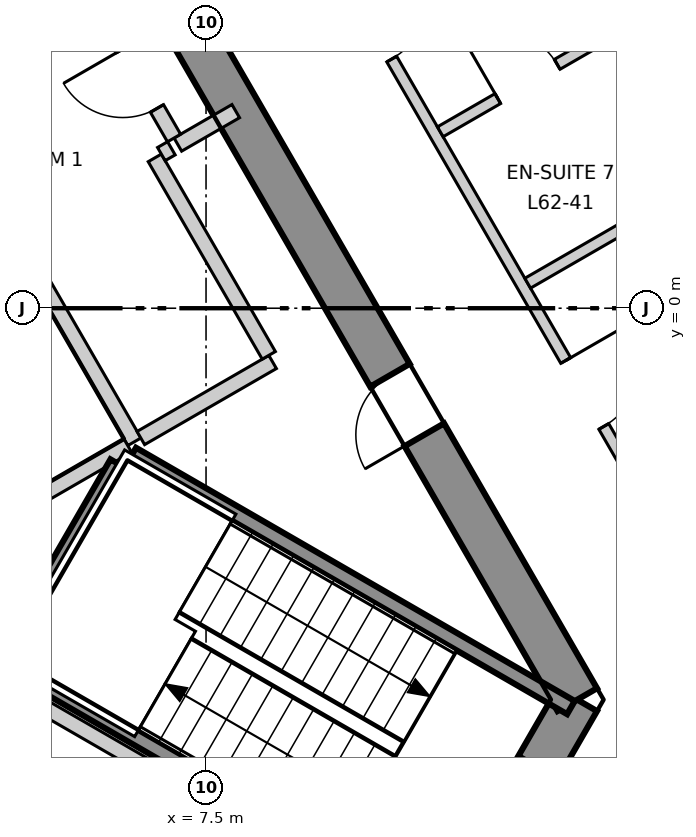
"""IFC4 building model, lengths in metres.
Left out: names, types, materials, properties, quantities, classifications, styles, units other than length and angle.
Written with IfcOpenShell. Run it as: python <this file> out.ifc"""

import sys

from ifc_helpers import new_model, si_unit, direction, frame, frame_2d, origin, place, context, subcontext, project, spatial, polyline, rectangle, outline, extrude, element, fill, save


model = new_model("IFC4")
c1 = context("Model", 3, precision=1e-05, world=origin(), true_north=direction((0.0, 1.0)))
c2 = subcontext(c1, "Body", "Model", "MODEL_VIEW")
j1 = project(units=[si_unit("LENGTHUNIT", "METRE"), si_unit("PLANEANGLEUNIT", "RADIAN")], contexts=[c1])
p1 = place(None, origin())
s1 = spatial("IfcSite", under=j1, at=p1, CompositionType="ELEMENT")
p2 = place(p1, origin())
s2 = spatial("IfcBuilding", under=s1, at=p2, CompositionType="ELEMENT")
p3 = place(p2, frame((0.0, 0.0, 268.3)))
s3 = spatial("IfcBuildingStorey", under=s2, at=p3, CompositionType="ELEMENT", Elevation=268.3)
p4 = place(p3, frame((10.652, -8.15, -0.3), z_axis=(0.0, 0.0, 1.0), x_axis=(0.49997462182, 0.866040055388, 0.0)))
e1 = element("IfcWall", 1, at=p4, inside=s3, PredefinedType="SHEAR", context=c2, shape_type="SweptSolid", body=[
    extrude(outline(polyline([(-0.173, -0.3), (1.732, -0.301), (3.638, -0.301), (3.291, 0.3), (1.732, 0.3), (0.173, 0.3), (-0.173, -0.3)])), origin(), (0.0, 0.0, 1.0), 3.6),
])
p5 = place(p4, frame((1.032, 0.0, 0.3)))
e2 = element("IfcOpeningElement", 2, at=p5, cuts=e1, PredefinedType="OPENING", context=c2, shape_type="SweptSolid", body=[
    extrude(rectangle(XDim=1.4, YDim=2.1, at=frame_2d((0.7, 1.05))), frame((0.0, 0.31, 0.0), z_axis=(0.0, -1.0, 0.0), x_axis=(1.0, 0.0, 0.0)), (0.0, 0.0, 1.0), 0.621),
])
p6 = place(p3, frame((12.384, -5.15, -0.3), z_axis=(0.0, 0.0, 1.0), x_axis=(-0.500000539815, 0.866025092122, 0.0)))
e3 = element("IfcWall", 3, at=p6, inside=s3, PredefinedType="SHEAR", context=c2, shape_type="SweptSolid", body=[
    extrude(outline(polyline([(-0.173, -0.301), (1.795, -0.301), (3.763, -0.301), (5.731, -0.301), (7.7, -0.301), (9.668, -0.301), (11.636, -0.301), (13.604, -0.3), (15.573, -0.3), (17.541, -0.3), (19.509, -0.3), (21.477, -0.3), (21.131, 0.3), (19.226, 0.3), (17.321, 0.3), (15.415, 0.3), (13.51, 0.3), (11.605, 0.3), (9.699, 0.3), (7.794, 0.3), (5.889, 0.3), (3.984, 0.3), (2.078, 0.3), (0.173, 0.3), (-0.173, -0.301)])), origin(), (0.0, 0.0, 1.0), 3.6),
])
p7 = place(p6, frame((15.627, 0.0, 0.3)))
e4 = element("IfcOpeningElement", 4, at=p7, cuts=e3, PredefinedType="OPENING", context=c2, shape_type="SweptSolid", body=[
    extrude(rectangle(XDim=0.9, YDim=2.1, at=frame_2d((0.45, 1.05))), frame((0.0, 0.31, 0.0), z_axis=(0.0, -1.0, 0.0), x_axis=(1.0, 0.0, 0.0)), (0.0, 0.0, 1.0), 0.621),
])
p8 = place(p6, frame((4.026, 0.0, 0.3)))
e5 = element("IfcOpeningElement", 5, at=p8, cuts=e3, PredefinedType="OPENING", context=c2, shape_type="SweptSolid", body=[
    extrude(rectangle(XDim=0.9, YDim=2.1, at=frame_2d((0.45, 1.05))), frame((0.0, 0.31, 0.0), z_axis=(0.0, -1.0, 0.0), x_axis=(1.0, 0.0, 0.0)), (0.0, 0.0, 1.0), 0.621),
])
p9 = place(p3, frame((26.205, -12.154, 0.0), z_axis=(0.0, 0.0, 1.0), x_axis=(-0.49999909388, 0.866025926932, 0.0)))
e6 = element("IfcWall", 6, at=p9, inside=s3, PredefinedType="ELEMENTEDWALL", context=c2, shape_type="SweptSolid", body=[
    extrude(rectangle(XDim=47.236, YDim=0.2, at=frame_2d((23.618, 0.0))), origin(), (0.0, 0.0, 1.0), 3.3),
])
p10 = place(p9, frame((2.243, 0.0, 0.9)))
e7 = element("IfcOpeningElement", 7, at=p10, cuts=e6, PredefinedType="OPENING", context=c2, shape_type="SweptSolid", body=[
    extrude(rectangle(XDim=3.7, YDim=2.2, at=frame_2d((1.85, 1.1))), frame((0.0, 0.11, 0.0), z_axis=(0.0, -1.0, 0.0), x_axis=(1.0, 0.0, 0.0)), (0.0, 0.0, 1.0), 0.22),
])
p11 = place(p9, frame((7.825, 0.0, 0.9)))
e8 = element("IfcOpeningElement", 8, at=p11, cuts=e6, PredefinedType="OPENING", context=c2, shape_type="SweptSolid", body=[
    extrude(rectangle(XDim=3.7, YDim=2.2, at=frame_2d((1.85, 1.1))), frame((0.0, 0.11, 0.0), z_axis=(0.0, -1.0, 0.0), x_axis=(1.0, 0.0, 0.0)), (0.0, 0.0, 1.0), 0.22),
])
p12 = place(p9, frame((13.406, 0.0, 0.9)))
e9 = element("IfcOpeningElement", 9, at=p12, cuts=e6, PredefinedType="OPENING", context=c2, shape_type="SweptSolid", body=[
    extrude(rectangle(XDim=3.7, YDim=2.2, at=frame_2d((1.85, 1.1))), frame((0.0, 0.11, 0.0), z_axis=(0.0, -1.0, 0.0), x_axis=(1.0, 0.0, 0.0)), (0.0, 0.0, 1.0), 0.22),
])
p13 = place(p9, frame((18.987, 0.0, 0.9)))
e10 = element("IfcOpeningElement", 10, at=p13, cuts=e6, PredefinedType="OPENING", context=c2, shape_type="SweptSolid", body=[
    extrude(rectangle(XDim=3.7, YDim=2.2, at=frame_2d((1.85, 1.1))), frame((0.0, 0.11, 0.0), z_axis=(0.0, -1.0, 0.0), x_axis=(1.0, 0.0, 0.0)), (0.0, 0.0, 1.0), 0.22),
])
p14 = place(p9, frame((24.569, 0.0, 0.9)))
e11 = element("IfcOpeningElement", 11, at=p14, cuts=e6, PredefinedType="OPENING", context=c2, shape_type="SweptSolid", body=[
    extrude(rectangle(XDim=3.7, YDim=2.2, at=frame_2d((1.85, 1.1))), frame((0.0, 0.11, 0.0), z_axis=(0.0, -1.0, 0.0), x_axis=(1.0, 0.0, 0.0)), (0.0, 0.0, 1.0), 0.22),
])
p15 = place(p9, frame((30.15, 0.0, 0.9)))
e12 = element("IfcOpeningElement", 12, at=p15, cuts=e6, PredefinedType="OPENING", context=c2, shape_type="SweptSolid", body=[
    extrude(rectangle(XDim=3.7, YDim=2.2, at=frame_2d((1.85, 1.1))), frame((0.0, 0.11, 0.0), z_axis=(0.0, -1.0, 0.0), x_axis=(1.0, 0.0, 0.0)), (0.0, 0.0, 1.0), 0.22),
])
p16 = place(p9, frame((35.732, 0.0, 0.9)))
e13 = element("IfcOpeningElement", 13, at=p16, cuts=e6, PredefinedType="OPENING", context=c2, shape_type="SweptSolid", body=[
    extrude(rectangle(XDim=3.7, YDim=2.2, at=frame_2d((1.85, 1.1))), frame((0.0, 0.11, 0.0), z_axis=(0.0, -1.0, 0.0), x_axis=(1.0, 0.0, 0.0)), (0.0, 0.0, 1.0), 0.22),
])
p17 = place(p9, frame((41.313, 0.0, 0.9)))
e14 = element("IfcOpeningElement", 14, at=p17, cuts=e6, PredefinedType="OPENING", context=c2, shape_type="SweptSolid", body=[
    extrude(rectangle(XDim=3.7, YDim=2.2, at=frame_2d((1.85, 1.1))), frame((0.0, 0.11, 0.0), z_axis=(0.0, -1.0, 0.0), x_axis=(1.0, 0.0, 0.0)), (0.0, 0.0, 1.0), 0.22),
])
p18 = place(p3, frame((0.075, 20.37, 0.0), z_axis=(0.0, 0.0, 1.0), x_axis=(0.499988971979, -0.866031770721, 0.0)))
e15 = element("IfcWall", 15, at=p18, inside=s3, PredefinedType="PARTITIONING", context=c2, shape_type="SweptSolid", body=[
    extrude(rectangle(XDim=35.207, YDim=0.15, at=frame_2d((17.604, 0.0))), origin(), (0.0, 0.0, 1.0), 3.3),
])
p19 = place(p18, frame((31.606, 0.0, 0.0)))
e16 = element("IfcOpeningElement", 16, at=p19, cuts=e15, PredefinedType="OPENING", context=c2, shape_type="SweptSolid", body=[
    extrude(rectangle(XDim=1.0, YDim=2.1, at=frame_2d((0.5, 1.05))), frame((0.0, 0.085, 0.0), z_axis=(0.0, -1.0, 0.0), x_axis=(1.0, 0.0, 0.0)), (0.0, 0.0, 1.0), 0.17),
])
p20 = place(p18, frame((24.316, 0.0, 0.0)))
e17 = element("IfcOpeningElement", 17, at=p20, cuts=e15, PredefinedType="OPENING", context=c2, shape_type="SweptSolid", body=[
    extrude(rectangle(XDim=1.0, YDim=2.1, at=frame_2d((0.5, 1.05))), frame((0.0, 0.085, 0.0), z_axis=(0.0, -1.0, 0.0), x_axis=(1.0, 0.0, 0.0)), (0.0, 0.0, 1.0), 0.17),
])
p21 = place(p18, frame((18.735, 0.0, 0.0)))
e18 = element("IfcOpeningElement", 18, at=p21, cuts=e15, PredefinedType="OPENING", context=c2, shape_type="SweptSolid", body=[
    extrude(rectangle(XDim=1.0, YDim=2.1, at=frame_2d((0.5, 1.05))), frame((0.0, 0.085, 0.0), z_axis=(0.0, -1.0, 0.0), x_axis=(1.0, 0.0, 0.0)), (0.0, 0.0, 1.0), 0.17),
])
p22 = place(p18, frame((8.154, 0.0, 0.0)))
e19 = element("IfcOpeningElement", 19, at=p22, cuts=e15, PredefinedType="OPENING", context=c2, shape_type="SweptSolid", body=[
    extrude(rectangle(XDim=1.0, YDim=2.1, at=frame_2d((0.5, 1.05))), frame((0.0, 0.085, 0.0), z_axis=(0.0, -1.0, 0.0), x_axis=(1.0, 0.0, 0.0)), (0.0, 0.0, 1.0), 0.17),
])
p23 = place(p18, frame((13.754, 0.0, 0.0)))
e20 = element("IfcOpeningElement", 20, at=p23, cuts=e15, PredefinedType="OPENING", context=c2, shape_type="SweptSolid", body=[
    extrude(rectangle(XDim=0.9, YDim=2.1, at=frame_2d((0.45, 1.05))), frame((0.0, 0.085, 0.0), z_axis=(0.0, -1.0, 0.0), x_axis=(1.0, 0.0, 0.0)), (0.0, 0.0, 1.0), 0.17),
])
p24 = place(p18, frame((11.554, 0.0, 0.0)))
e21 = element("IfcOpeningElement", 21, at=p24, cuts=e15, PredefinedType="OPENING", context=c2, shape_type="SweptSolid", body=[
    extrude(rectangle(XDim=0.9, YDim=2.1, at=frame_2d((0.45, 1.05))), frame((0.0, 0.085, 0.0), z_axis=(0.0, -1.0, 0.0), x_axis=(1.0, 0.0, 0.0)), (0.0, 0.0, 1.0), 0.17),
])
p25 = place(p18, frame((2.69, 0.0, 0.0)))
e22 = element("IfcOpeningElement", 22, at=p25, cuts=e15, PredefinedType="OPENING", context=c2, shape_type="SweptSolid", body=[
    extrude(rectangle(XDim=1.0, YDim=2.1, at=frame_2d((0.5, 1.05))), frame((0.0, 0.085, 0.0), z_axis=(0.0, -1.0, 0.0), x_axis=(1.0, 0.0, 0.0)), (0.0, 0.0, 1.0), 0.17),
])
p26 = place(p3, frame((11.732, 0.329, 0.0), z_axis=(0.0, 0.0, 1.0), x_axis=(0.866043575568, 0.499968524226, 0.0)))
e23 = element("IfcWall", 23, at=p26, inside=s3, PredefinedType="PARTITIONING", context=c2, shape_type="SweptSolid", body=[
    extrude(rectangle(XDim=6.212, YDim=0.15, at=frame_2d((3.106, 0.0))), origin(), (0.0, 0.0, 1.0), 3.3),
])
p27 = place(p3, frame((12.856, 3.633, 0.0), z_axis=(0.0, 0.0, 1.0), x_axis=(0.500023359282, -0.866011916877, 0.0)))
e24 = element("IfcWall", 24, at=p27, inside=s3, PredefinedType="PARTITIONING", context=c2, shape_type="SweptSolid", body=[
    extrude(rectangle(XDim=2.224, YDim=0.15, at=frame_2d((1.112, 0.0))), origin(), (0.0, 0.0, 1.0), 3.3),
])
p28 = place(p3, frame((10.582, 2.321, 0.0), z_axis=(0.0, 0.0, 1.0), x_axis=(0.866102706185, 0.499866084405, 0.0)))
e25 = element("IfcWall", 25, at=p28, inside=s3, PredefinedType="PARTITIONING", context=c2, shape_type="SweptSolid", body=[
    extrude(rectangle(XDim=2.551, YDim=0.15, at=frame_2d((1.275, 0.0))), origin(), (0.0, 0.0, 1.0), 3.3),
])
p29 = place(p28, frame((0.875, 0.0, 0.0)))
e26 = element("IfcOpeningElement", 26, at=p29, cuts=e25, PredefinedType="OPENING", context=c2, shape_type="SweptSolid", body=[
    extrude(rectangle(XDim=0.9, YDim=2.1, at=frame_2d((0.45, 1.05))), frame((0.0, 0.085, 0.0), z_axis=(0.0, -1.0, 0.0), x_axis=(1.0, 0.0, 0.0)), (0.0, 0.0, 1.0), 0.17),
])
p30 = place(p3, frame((1.578, 2.874, 0.0), z_axis=(0.0, 0.0, 1.0), x_axis=(0.866045911672, 0.499964477614, 0.0)))
e27 = element("IfcWall", 27, at=p30, inside=s3, PredefinedType="SOLIDWALL", context=c2, shape_type="SweptSolid", body=[
    extrude(rectangle(XDim=5.327, YDim=0.2, at=frame_2d((2.663, 0.0))), origin(), (0.0, 0.0, 1.0), 3.3),
])
p31 = place(p30, frame((2.496, 0.0, 0.0)))
e28 = element("IfcOpeningElement", 28, at=p31, cuts=e27, PredefinedType="OPENING", context=c2, shape_type="SweptSolid", body=[
    extrude(rectangle(XDim=1.1, YDim=2.1, at=frame_2d((0.55, 1.05))), frame((0.0, 0.11, 0.0), z_axis=(0.0, -1.0, 0.0), x_axis=(1.0, 0.0, 0.0)), (0.0, 0.0, 1.0), 0.22),
])
p32 = place(p3, frame((5.007, 0.928, 0.0), z_axis=(0.0, 0.0, 1.0), x_axis=(0.499899694197, -0.866083307622, 0.0)))
e29 = element("IfcWall", 29, at=p32, inside=s3, PredefinedType="SOLIDWALL", context=c2, shape_type="SweptSolid", body=[
    extrude(rectangle(XDim=3.1, YDim=0.2, at=frame_2d((1.55, 0.0))), origin(), (0.0, 0.0, 1.0), 3.3),
])
p33 = place(p3, frame((7.129, 2.153, 0.0), z_axis=(0.0, 0.0, 1.0), x_axis=(0.866083962871, 0.499898558967, 0.0)))
e30 = element("IfcWall", 30, at=p33, inside=s3, PredefinedType="SOLIDWALL", context=c2, shape_type="SweptSolid", body=[
    extrude(rectangle(XDim=0.88, YDim=0.2, at=frame_2d((0.44, 0.0))), origin(), (0.0, 0.0, 1.0), 3.3),
])
p34 = place(p3, frame((6.129, 3.885, 0.0), z_axis=(0.0, 0.0, 1.0), x_axis=(0.499952260202, -0.866052964615, 0.0)))
e31 = element("IfcWall", 31, at=p34, inside=s3, PredefinedType="SOLIDWALL", context=c2, shape_type="SweptSolid", body=[
    extrude(rectangle(XDim=1.901, YDim=0.2, at=frame_2d((0.95, 0.0))), origin(), (0.0, 0.0, 1.0), 3.3),
])
p35 = place(p34, frame((0.55, 0.0, 0.0)))
e32 = element("IfcOpeningElement", 32, at=p35, cuts=e31, PredefinedType="OPENING", context=c2, shape_type="SweptSolid", body=[
    extrude(rectangle(XDim=0.9, YDim=2.1, at=frame_2d((0.45, 1.05))), frame((0.0, 0.11, 0.0), z_axis=(0.0, -1.0, 0.0), x_axis=(1.0, 0.0, 0.0)), (0.0, 0.0, 1.0), 0.22),
])
p36 = place(p3, frame((2.275, 1.66, 0.0), z_axis=(0.0, 0.0, 1.0), x_axis=(0.866013608182, 0.500020430026, 0.0)))
e33 = element("IfcWall", 33, at=p36, inside=s3, PredefinedType="SOLIDWALL", context=c2, shape_type="SweptSolid", body=[
    extrude(rectangle(XDim=4.35, YDim=0.2, at=frame_2d((2.175, 0.0))), origin(), (0.0, 0.0, 1.0), 3.3),
])
p37 = place(p3, frame((4.9, -2.714, 0.0), z_axis=(0.0, 0.0, 1.0), x_axis=(0.865846928409, 0.500309001083, 0.0)))
e34 = element("IfcWall", 34, at=p37, inside=s3, PredefinedType="SOLIDWALL", context=c2, shape_type="SweptSolid", body=[
    extrude(rectangle(XDim=1.813, YDim=0.2, at=frame_2d((0.907, 0.0))), origin(), (0.0, 0.0, 1.0), 3.3),
])
p38 = place(p3, frame((4.9, -4.98, 0.0), z_axis=(0.0, 0.0, 1.0), x_axis=(0.866074613031, -0.499914757397, 0.0)))
e35 = element("IfcWall", 35, at=p38, inside=s3, PredefinedType="SOLIDWALL", context=c2, shape_type="SweptSolid", body=[
    extrude(rectangle(XDim=6.301, YDim=0.2, at=frame_2d((3.15, 0.0))), origin(), (0.0, 0.0, 1.0), 3.3),
])
p39 = place(p3, frame((6.642, -1.708, 0.0), z_axis=(0.0, 0.0, 1.0), x_axis=(0.866043441391, 0.499968756647, 0.0)))
e36 = element("IfcWall", 36, at=p39, inside=s3, PredefinedType="SOLIDWALL", context=c2, shape_type="SweptSolid", body=[
    extrude(rectangle(XDim=2.002, YDim=0.2, at=frame_2d((1.001, 0.0))), origin(), (0.0, 0.0, 1.0), 3.3),
])
p40 = place(p3, frame((6.826, 1.978, 0.0), z_axis=(0.0, 0.0, 1.0), x_axis=(0.499990139034, -0.866031096941, 0.0)))
e37 = element("IfcWall", 37, at=p40, inside=s3, PredefinedType="SOLIDWALL", context=c2, shape_type="SweptSolid", body=[
    extrude(rectangle(XDim=3.0, YDim=0.2, at=frame_2d((1.5, 0.0))), origin(), (0.0, 0.0, 1.0), 3.3),
])
p41 = place(p3, frame((6.912, 2.028, 0.0), z_axis=(0.0, 0.0, 1.0), x_axis=(0.866559367082, 0.499074005857, 0.0)))
e38 = element("IfcWall", 38, at=p41, inside=s3, PredefinedType="SOLIDWALL", context=c2, shape_type="SweptSolid", body=[
    extrude(rectangle(XDim=0.152, YDim=0.2, at=frame_2d((0.076, 0.0))), origin(), (0.0, 0.0, 1.0), 3.3),
])
p42 = place(p3, frame((4.929, -4.693, 0.0), z_axis=(0.0, 0.0, 1.0), x_axis=(0.866005022404, -0.500035299925, 0.0)))
e39 = element("IfcWall", 39, at=p42, inside=s3, PredefinedType="SOLIDWALL", context=c2, shape_type="SweptSolid", body=[
    extrude(rectangle(XDim=6.665, YDim=0.2, at=frame_2d((3.333, 0.0))), origin(), (0.0, 0.0, 1.0), 3.3),
])
p43 = place(p3, frame((4.929, -4.462, 0.0), z_axis=(0.0, 0.0, 1.0), x_axis=(0.500200581029, 0.865909567298, 0.0)))
e40 = element("IfcWall", 40, at=p43, inside=s3, PredefinedType="SOLIDWALL", context=c2, shape_type="SweptSolid", body=[
    extrude(rectangle(XDim=2.799, YDim=0.2, at=frame_2d((1.399, 0.0))), origin(), (0.0, 0.0, 1.0), 3.3),
])
p44 = place(p3, frame((6.529, -1.922, 0.0), z_axis=(0.0, 0.0, 1.0), x_axis=(0.866068467981, -0.499925403204, 0.0)))
e41 = element("IfcWall", 41, at=p44, inside=s3, PredefinedType="SOLIDWALL", context=c2, shape_type="SweptSolid", body=[
    extrude(rectangle(XDim=6.665, YDim=0.2, at=frame_2d((3.332, 0.0))), origin(), (0.0, 0.0, 1.0), 3.3),
])
p45 = place(p20, origin())
e42 = element("IfcDoor", 42, at=p45, inside=s3, OperationType="SINGLE_SWING_RIGHT", PredefinedType="DOOR", context=c2, shape_type="SweptSolid", body=[
    extrude(rectangle(XDim=1.0, YDim=2.1, at=frame_2d((0.5, 1.05))), frame((0.0, 0.025, 0.0), z_axis=(0.0, -1.0, 0.0), x_axis=(1.0, 0.0, 0.0)), (0.0, 0.0, 1.0), 0.05),
])
fill(e17, e42)
p46 = place(p21, origin())
e43 = element("IfcDoor", 43, at=p46, inside=s3, OperationType="SINGLE_SWING_RIGHT", PredefinedType="DOOR", context=c2, shape_type="SweptSolid", body=[
    extrude(rectangle(XDim=1.0, YDim=2.1, at=frame_2d((0.5, 1.05))), frame((0.0, 0.025, 0.0), z_axis=(0.0, -1.0, 0.0), x_axis=(1.0, 0.0, 0.0)), (0.0, 0.0, 1.0), 0.05),
])
fill(e18, e43)
p47 = place(p29, origin())
e44 = element("IfcDoor", 44, at=p47, inside=s3, OperationType="SINGLE_SWING_RIGHT", PredefinedType="DOOR", context=c2, shape_type="SweptSolid", body=[
    extrude(rectangle(XDim=0.9, YDim=2.1, at=frame_2d((0.45, 1.05))), frame((0.0, 0.025, 0.0), z_axis=(0.0, -1.0, 0.0), x_axis=(1.0, 0.0, 0.0)), (0.0, 0.0, 1.0), 0.05),
])
fill(e26, e44)
p48 = place(p8, origin())
e45 = element("IfcDoor", 45, at=p48, inside=s3, OperationType="SINGLE_SWING_RIGHT", PredefinedType="DOOR", context=c2, shape_type="SweptSolid", body=[
    extrude(rectangle(XDim=0.9, YDim=2.1, at=frame_2d((0.45, 1.05))), frame((0.0, 0.025, 0.0), z_axis=(0.0, -1.0, 0.0), x_axis=(1.0, 0.0, 0.0)), (0.0, 0.0, 1.0), 0.05),
])
fill(e5, e45)
p49 = place(p35, origin())
e46 = element("IfcDoor", 46, at=p49, inside=s3, OperationType="SINGLE_SWING_LEFT", PredefinedType="DOOR", context=c2, shape_type="SweptSolid", body=[
    extrude(rectangle(XDim=0.9, YDim=2.1, at=frame_2d((0.45, 1.05))), frame((0.0, 0.025, 0.0), z_axis=(0.0, -1.0, 0.0), x_axis=(1.0, 0.0, 0.0)), (0.0, 0.0, 1.0), 0.05),
])
fill(e32, e46)
save(model, sys.argv[1])
